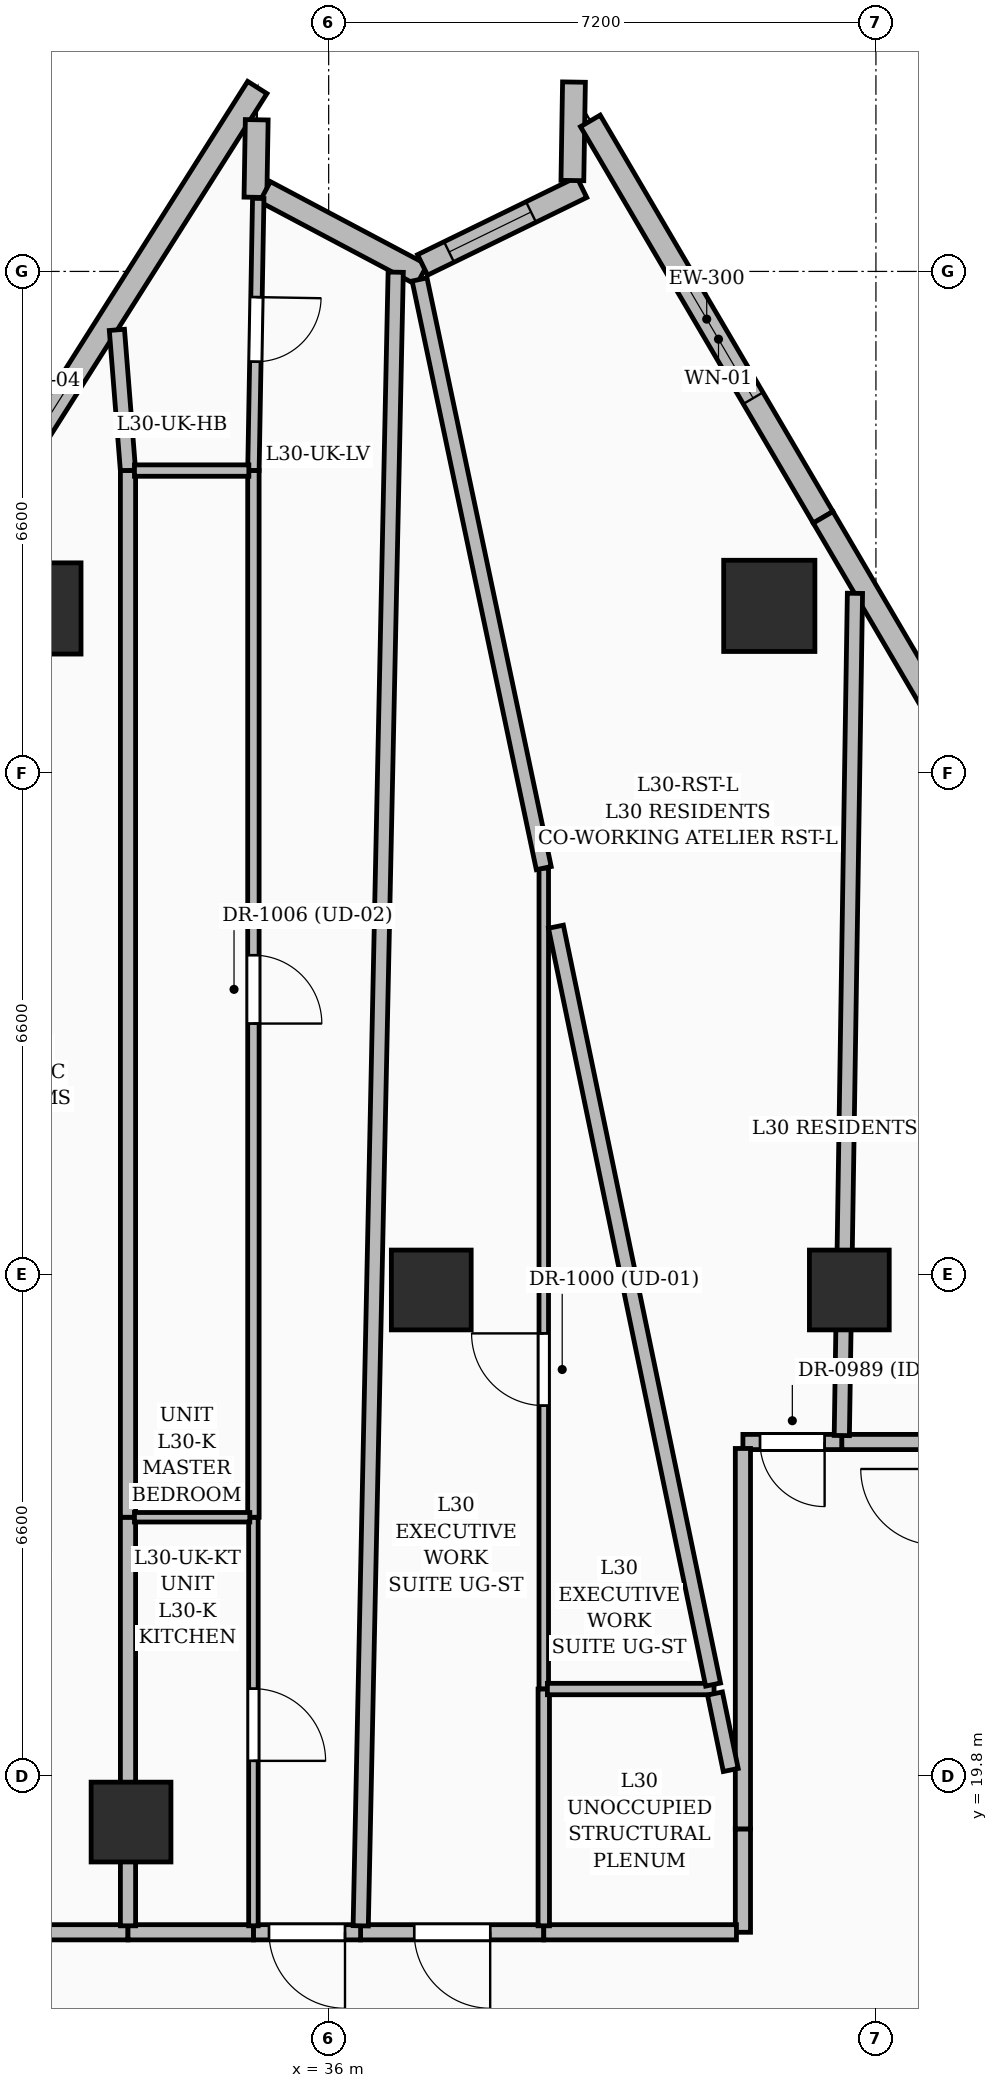
"""IFC4 building model, lengths in metres.
Left out: names, types, materials, properties, quantities, classifications, styles, units other than length and angle.
Written with IfcOpenShell. Run it as: python <this file> out.ifc"""

import sys

from ifc_helpers import new_model, si_unit, direction, frame, frame_2d, origin, origin_2d, place, context, subcontext, project, spatial, rectangle, extrude, element, fill, save


model = new_model("IFC4")
c1 = context("Model", 3, precision=1e-05, world=origin(), true_north=direction((0.0, 1.0)))
c2 = subcontext(c1, "Body", "Model", "MODEL_VIEW")
j1 = project(units=[si_unit("LENGTHUNIT", "METRE"), si_unit("PLANEANGLEUNIT", "RADIAN")], contexts=[c1])
p1 = place(None, origin())
s1 = spatial("IfcSite", under=j1, at=p1, CompositionType="ELEMENT")
p2 = place(p1, origin())
s2 = spatial("IfcBuilding", under=s1, at=p2, CompositionType="ELEMENT")
p3 = place(p2, frame((0.0, 0.0, 121.2)))
s3 = spatial("IfcBuildingStorey", under=s2, at=p3, CompositionType="ELEMENT", Elevation=121.2)
for number, where, z_axis, x_axis in (
    (1, (42.85, 26.2, 0.0), (0.0, 0.0, 1.0), (1.0, 0.0, 0.0)),
    (2, (37.35, 26.2, 0.0), (0.0, 0.0, 1.0), (1.0, 0.0, 0.0)),
    (3, (33.4, 19.2, 0.0), (0.0, 0.0, 1.0), (1.0, 0.0, 0.0)),
):
    element("IfcColumn", number, at=place(p3, frame(where, z_axis=z_axis, x_axis=x_axis)), inside=s3, PredefinedType="COLUMN", context=c2, shape_type="SweptSolid", body=[
        extrude(rectangle(XDim=1.05, YDim=1.05, at=origin_2d()), origin(), (0.0, 0.0, 1.0), 3.6),
    ])
for number, where, z_axis, x_axis in (
    (4, (41.797, 35.2, 0.0), (0.0, 0.0, 1.0), (1.0, 0.0, 0.0)),
    (5, (32.142, 35.166, 0.0), (0.0, 0.0, 1.0), (1.0, 0.0, 0.0)),
):
    element("IfcColumn", number, at=place(p3, frame(where, z_axis=z_axis, x_axis=x_axis)), inside=s3, PredefinedType="COLUMN", context=c2, shape_type="SweptSolid", body=[
        extrude(rectangle(XDim=1.2, YDim=1.2, at=origin_2d()), origin(), (0.0, 0.0, 1.0), 3.6),
    ])
p4 = place(p3, frame((31.604, 36.56, 0.0), z_axis=(0.0, 0.0, 1.0), x_axis=(0.53489387979, 0.844919249019, 0.0)))
e6 = element("IfcWall", 6, at=p4, inside=s3, PredefinedType="SOLIDWALL", context=c2, shape_type="SweptSolid", body=[
    extrude(rectangle(XDim=6.462, YDim=0.3, at=frame_2d((3.231, 0.0))), origin(), (0.0, 0.0, 1.0), 3.35),
])
p5 = place(p4, frame((0.675, 0.0, 0.8)))
e7 = element("IfcOpeningElement", 7, at=p5, cuts=e6, PredefinedType="OPENING", context=c2, shape_type="SweptSolid", body=[
    extrude(rectangle(XDim=1.2, YDim=1.8, at=frame_2d((0.6, 0.9))), frame((0.0, 0.16, 0.0), z_axis=(0.0, -1.0, 0.0), x_axis=(1.0, 0.0, 0.0)), (0.0, 0.0, 1.0), 0.32),
])
p6 = place(p3, frame((35.054, 41.595, 0.0), z_axis=(0.0, 0.0, 1.0), x_axis=(-0.016748069368, -0.99985974125, 0.0)))
e8 = element("IfcWall", 8, at=p6, inside=s3, PredefinedType="SOLIDWALL", context=c2, shape_type="SweptSolid", body=[
    extrude(rectangle(XDim=1.021, YDim=0.3, at=frame_2d((0.51, 0.0))), origin(), (0.0, 0.0, 1.0), 3.35),
])
p7 = place(p3, frame((35.163, 40.649, 0.0), z_axis=(0.0, 0.0, 1.0), x_axis=(0.883579385988, -0.468281399008, 0.0)))
e9 = element("IfcWall", 9, at=p7, inside=s3, PredefinedType="SOLIDWALL", context=c2, shape_type="SweptSolid", body=[
    extrude(rectangle(XDim=2.336, YDim=0.3, at=frame_2d((1.168, 0.0))), origin(), (0.0, 0.0, 1.0), 3.35),
])
p8 = place(p3, frame((37.235, 39.686, 0.0), z_axis=(0.0, 0.0, 1.0), x_axis=(0.898742269497, 0.438477289058, 0.0)))
e10 = element("IfcWall", 10, at=p8, inside=s3, PredefinedType="SOLIDWALL", context=c2, shape_type="SweptSolid", body=[
    extrude(rectangle(XDim=2.331, YDim=0.3, at=frame_2d((1.166, 0.0))), origin(), (0.0, 0.0, 1.0), 3.35),
])
p9 = place(p8, frame((0.388, 0.0, 0.8)))
e11 = element("IfcOpeningElement", 11, at=p9, cuts=e10, PredefinedType="OPENING", context=c2, shape_type="SweptSolid", body=[
    extrude(rectangle(XDim=1.2, YDim=1.8, at=frame_2d((0.6, 0.9))), frame((0.0, 0.16, 0.0), z_axis=(0.0, -1.0, 0.0), x_axis=(1.0, 0.0, 0.0)), (0.0, 0.0, 1.0), 0.32),
])
p10 = place(p3, frame((39.206, 40.796, 0.0), z_axis=(0.0, 0.0, 1.0), x_axis=(0.016208991858, 0.999868625662, 0.0)))
e12 = element("IfcWall", 12, at=p10, inside=s3, PredefinedType="SOLIDWALL", context=c2, shape_type="SweptSolid", body=[
    extrude(rectangle(XDim=1.295, YDim=0.3, at=frame_2d((0.648, 0.0))), origin(), (0.0, 0.0, 1.0), 3.35),
])
p11 = place(p3, frame((39.443, 41.58, 0.0), z_axis=(0.0, 0.0, 1.0), x_axis=(0.506351339064, -0.862327270489, 0.0)))
e13 = element("IfcWall", 13, at=p11, inside=s3, PredefinedType="SOLIDWALL", context=c2, shape_type="SweptSolid", body=[
    extrude(rectangle(XDim=6.048, YDim=0.3, at=frame_2d((3.024, 0.0))), origin(), (0.0, 0.0, 1.0), 3.35),
])
p12 = place(p11, frame((2.43, 0.0, 0.6)))
e14 = element("IfcOpeningElement", 14, at=p12, cuts=e13, PredefinedType="OPENING", context=c2, shape_type="SweptSolid", body=[
    extrude(rectangle(XDim=1.8, YDim=2.1, at=frame_2d((0.9, 1.05))), frame((0.0, 0.16, 0.0), z_axis=(0.0, -1.0, 0.0), x_axis=(1.0, 0.0, 0.0)), (0.0, 0.0, 1.0), 0.32),
])
p13 = place(p3, frame((42.505, 36.365, 0.0), z_axis=(0.0, 0.0, 1.0), x_axis=(0.506323446146, -0.862343648369, 0.0)))
e15 = element("IfcWall", 15, at=p13, inside=s3, PredefinedType="SOLIDWALL", context=c2, shape_type="SweptSolid", body=[
    extrude(rectangle(XDim=6.617, YDim=0.3, at=frame_2d((3.309, 0.0))), origin(), (0.0, 0.0, 1.0), 3.35),
])
p14 = place(p13, frame((3.1, 0.0, 0.55)))
e16 = element("IfcOpeningElement", 16, at=p14, cuts=e15, PredefinedType="OPENING", context=c2, shape_type="SweptSolid", body=[
    extrude(rectangle(XDim=1.6, YDim=2.2, at=frame_2d((0.8, 1.1))), frame((0.0, 0.16, 0.0), z_axis=(0.0, -1.0, 0.0), x_axis=(1.0, 0.0, 0.0)), (0.0, 0.0, 1.0), 0.32),
])
p15 = place(p3, frame((38.83, 17.75, 0.0), z_axis=(0.0, 0.0, 1.0), x_axis=(-1.0, 0.0, 0.0)))
e17 = element("IfcWall", 17, at=p15, inside=s3, PredefinedType="PARTITIONING", context=c2, shape_type="SweptSolid", body=[
    extrude(rectangle(XDim=2.41, YDim=0.2, at=frame_2d((1.205, 0.0))), origin(), (0.0, 0.0, 1.0), 3.35),
])
p16 = place(p15, frame((0.705, 0.0, 0.0)))
e18 = element("IfcOpeningElement", 18, at=p16, cuts=e17, PredefinedType="OPENING", context=c2, shape_type="SweptSolid", body=[
    extrude(rectangle(XDim=1.0, YDim=2.2, at=frame_2d((0.5, 1.1))), frame((0.0, 0.11, 0.0), z_axis=(0.0, -1.0, 0.0), x_axis=(1.0, 0.0, 0.0)), (0.0, 0.0, 1.0), 0.22),
])
p17 = place(p3, frame((41.45, 19.11, 0.0), z_axis=(0.0, 0.0, 1.0), x_axis=(0.0, -1.0, 0.0)))
e19 = element("IfcWall", 19, at=p17, inside=s3, PredefinedType="PARTITIONING", context=c2, shape_type="SweptSolid", body=[
    extrude(rectangle(XDim=1.36, YDim=0.2, at=frame_2d((0.68, 0.0))), origin(), (0.0, 0.0, 1.0), 3.35),
])
p18 = place(p3, frame((41.365, 17.75, 0.0), z_axis=(0.0, 0.0, 1.0), x_axis=(-1.0, 0.0, 0.0)))
e20 = element("IfcWall", 20, at=p18, inside=s3, PredefinedType="PARTITIONING", context=c2, shape_type="SweptSolid", body=[
    extrude(rectangle(XDim=2.535, YDim=0.2, at=frame_2d((1.268, 0.0))), origin(), (0.0, 0.0, 1.0), 3.35),
])
p19 = place(p3, frame((43.915, 24.2, 0.0), z_axis=(0.0, 0.0, 1.0), x_axis=(-1.0, 0.0, 0.0)))
e21 = element("IfcWall", 21, at=p19, inside=s3, PredefinedType="PARTITIONING", context=c2, shape_type="SweptSolid", body=[
    extrude(rectangle(XDim=1.165, YDim=0.2, at=frame_2d((0.583, 0.0))), origin(), (0.0, 0.0, 1.0), 2.436),
])
p20 = place(p3, frame((33.36, 17.75, 0.0), z_axis=(0.0, 0.0, 1.0), x_axis=(-1.0, 0.0, 0.0)))
e22 = element("IfcWall", 22, at=p20, inside=s3, PredefinedType="PARTITIONING", context=c2, shape_type="SweptSolid", body=[
    extrude(rectangle(XDim=1.41, YDim=0.2, at=frame_2d((0.705, 0.0))), origin(), (0.0, 0.0, 1.0), 3.35),
])
p21 = place(p3, frame((36.42, 17.75, 0.0), z_axis=(0.0, 0.0, 1.0), x_axis=(-1.0, 0.0, 0.0)))
e23 = element("IfcWall", 23, at=p21, inside=s3, PredefinedType="PARTITIONING", context=c2, shape_type="SweptSolid", body=[
    extrude(rectangle(XDim=1.41, YDim=0.2, at=frame_2d((0.705, 0.0))), origin(), (0.0, 0.0, 1.0), 3.35),
])
p22 = place(p21, frame((0.205, 0.0, 0.0)))
e24 = element("IfcOpeningElement", 24, at=p22, cuts=e23, PredefinedType="OPENING", context=c2, shape_type="SweptSolid", body=[
    extrude(rectangle(XDim=1.0, YDim=2.2, at=frame_2d((0.5, 1.1))), frame((0.0, 0.11, 0.0), z_axis=(0.0, -1.0, 0.0), x_axis=(1.0, 0.0, 0.0)), (0.0, 0.0, 1.0), 0.22),
])
p23 = place(p3, frame((35.01, 17.75, 0.0), z_axis=(0.0, 0.0, 1.0), x_axis=(-1.0, 0.0, 0.0)))
e25 = element("IfcWall", 25, at=p23, inside=s3, PredefinedType="PARTITIONING", context=c2, shape_type="SweptSolid", body=[
    extrude(rectangle(XDim=1.65, YDim=0.2, at=frame_2d((0.825, 0.0))), origin(), (0.0, 0.0, 1.0), 2.436),
])
p24 = place(p3, frame((42.75, 24.2, 0.0), z_axis=(0.0, 0.0, 1.0), x_axis=(-1.0, 0.0, 0.0)))
e26 = element("IfcWall", 26, at=p24, inside=s3, PredefinedType="PARTITIONING", context=c2, shape_type="SweptSolid", body=[
    extrude(rectangle(XDim=1.3, YDim=0.2, at=frame_2d((0.65, 0.0))), origin(), (0.0, 0.0, 1.0), 3.35),
])
p25 = place(p24, frame((0.225, 0.0, 0.0)))
e27 = element("IfcOpeningElement", 27, at=p25, cuts=e26, PredefinedType="OPENING", context=c2, shape_type="SweptSolid", body=[
    extrude(rectangle(XDim=0.85, YDim=2.1, at=frame_2d((0.425, 1.05))), frame((0.0, 0.11, 0.0), z_axis=(0.0, -1.0, 0.0), x_axis=(1.0, 0.0, 0.0)), (0.0, 0.0, 1.0), 0.22),
])
p26 = place(p3, frame((41.45, 24.115, 0.0), z_axis=(0.0, 0.0, 1.0), x_axis=(0.0, -1.0, 0.0)))
e28 = element("IfcWall", 28, at=p26, inside=s3, PredefinedType="PARTITIONING", context=c2, shape_type="SweptSolid", body=[
    extrude(rectangle(XDim=5.005, YDim=0.2, at=frame_2d((2.502, 0.0))), origin(), (0.0, 0.0, 1.0), 3.35),
])
p27 = place(p3, frame((38.83, 20.95, 0.0), z_axis=(0.0, 0.0, 1.0), x_axis=(0.0, 1.0, 0.0)))
e29 = element("IfcWall", 29, at=p27, inside=s3, PredefinedType="PARTITIONING", context=c2, shape_type="SweptSolid", body=[
    extrude(rectangle(XDim=10.8, YDim=0.125, at=frame_2d((5.4, 0.0))), origin(), (0.0, 0.0, 1.0), 2.436),
])
p28 = place(p27, frame((3.729, 0.0, 0.0)))
e30 = element("IfcOpeningElement", 30, at=p28, cuts=e29, PredefinedType="OPENING", context=c2, shape_type="SweptSolid", body=[
    extrude(rectangle(XDim=0.95, YDim=2.2, at=frame_2d((0.475, 1.1))), frame((0.0, 0.072, 0.0), z_axis=(0.0, -1.0, 0.0), x_axis=(1.0, 0.0, 0.0)), (0.0, 0.0, 1.0), 0.145),
])
p29 = place(p3, frame((38.83, 17.835, 0.0), z_axis=(0.0, 0.0, 1.0), x_axis=(0.0, 1.0, 0.0)))
e31 = element("IfcWall", 31, at=p29, inside=s3, PredefinedType="PARTITIONING", context=c2, shape_type="SweptSolid", body=[
    extrude(rectangle(XDim=3.115, YDim=0.15, at=frame_2d((1.558, 0.0))), origin(), (0.0, 0.0, 1.0), 3.35),
])
p30 = place(p3, frame((36.882, 39.59, 0.0), z_axis=(0.0, 0.0, 1.0), x_axis=(-0.02116035097, -0.999776094707, 0.0)))
e32 = element("IfcWall", 32, at=p30, inside=s3, PredefinedType="PARTITIONING", context=c2, shape_type="SweptSolid", body=[
    extrude(rectangle(XDim=21.76, YDim=0.2, at=frame_2d((10.88, 0.0))), origin(), (0.0, 0.0, 1.0), 2.372),
])
p31 = place(p3, frame((38.83, 31.75, 0.0), z_axis=(0.0, 0.0, 1.0), x_axis=(-0.206462862954, 0.978454437478, 0.0)))
e33 = element("IfcWall", 33, at=p31, inside=s3, PredefinedType="PARTITIONING", context=c2, shape_type="SweptSolid", body=[
    extrude(rectangle(XDim=7.914, YDim=0.2, at=frame_2d((3.957, 0.0))), origin(), (0.0, 0.0, 1.0), 2.57),
])
p32 = place(p3, frame((38.877, 20.95, 0.0), z_axis=(0.0, 0.0, 1.0), x_axis=(1.0, 0.0, 0.0)))
e34 = element("IfcWall", 34, at=p32, inside=s3, PredefinedType="PARTITIONING", context=c2, shape_type="SweptSolid", body=[
    extrude(rectangle(XDim=2.193, YDim=0.15, at=frame_2d((1.096, 0.0))), origin(), (0.0, 0.0, 1.0), 3.35),
])
p33 = place(p3, frame((41.058, 21.009, 0.0), z_axis=(0.0, 0.0, 1.0), x_axis=(-0.203082872661, 0.979161552979, 0.0)))
e35 = element("IfcWall", 35, at=p33, inside=s3, PredefinedType="PARTITIONING", context=c2, shape_type="SweptSolid", body=[
    extrude(rectangle(XDim=10.182, YDim=0.2, at=frame_2d((5.091, 0.0))), origin(), (0.0, 0.0, 1.0), 2.436),
])
p34 = place(p3, frame((41.29, 19.885, 0.0), z_axis=(0.0, 0.0, 1.0), x_axis=(-0.20246415957, 0.979289673227, 0.0)))
e36 = element("IfcWall", 36, at=p34, inside=s3, PredefinedType="PARTITIONING", context=c2, shape_type="SweptSolid", body=[
    extrude(rectangle(XDim=1.027, YDim=0.2, at=frame_2d((0.514, 0.0))), origin(), (0.0, 0.0, 1.0), 3.35),
])
p35 = place(p3, frame((42.924, 35.365, 0.0), z_axis=(0.0, 0.0, 1.0), x_axis=(-0.015620339734, -0.999877995051, 0.0)))
e37 = element("IfcWall", 37, at=p35, inside=s3, PredefinedType="PARTITIONING", context=c2, shape_type="SweptSolid", body=[
    extrude(rectangle(XDim=11.082, YDim=0.2, at=frame_2d((5.541, 0.0))), origin(), (0.0, 0.0, 1.0), 2.372),
])
p36 = place(p3, frame((33.36, 36.98, 0.0), z_axis=(0.0, 0.0, 1.0), x_axis=(-0.07862683496, 0.99690411817, 0.0)))
e38 = element("IfcWall", 38, at=p36, inside=s3, PredefinedType="PARTITIONING", context=c2, shape_type="SweptSolid", body=[
    extrude(rectangle(XDim=1.857, YDim=0.2, at=frame_2d((0.928, 0.0))), origin(), (0.0, 0.0, 1.0), 3.35),
])
p37 = place(p3, frame((33.36, 17.835, 0.0), z_axis=(0.0, 0.0, 1.0), x_axis=(0.0, 1.0, 0.0)))
e39 = element("IfcWall", 39, at=p37, inside=s3, PredefinedType="PARTITIONING", context=c2, shape_type="SweptSolid", body=[
    extrude(rectangle(XDim=5.375, YDim=0.2, at=frame_2d((2.688, 0.0))), origin(), (0.0, 0.0, 1.0), 2.436),
])
p38 = place(p3, frame((33.36, 23.21, 0.0), z_axis=(0.0, 0.0, 1.0), x_axis=(0.0, 1.0, 0.0)))
e40 = element("IfcWall", 40, at=p38, inside=s3, PredefinedType="PARTITIONING", context=c2, shape_type="SweptSolid", body=[
    extrude(rectangle(XDim=13.77, YDim=0.2, at=frame_2d((6.885, 0.0))), origin(), (0.0, 0.0, 1.0), 2.372),
])
p39 = place(p3, frame((35.073, 40.56, 0.0), z_axis=(0.0, 0.0, 1.0), x_axis=(-0.017726501673, -0.999842873225, 0.0)))
e41 = element("IfcWall", 41, at=p39, inside=s3, PredefinedType="PARTITIONING", context=c2, shape_type="SweptSolid", body=[
    extrude(rectangle(XDim=3.581, YDim=0.15, at=frame_2d((1.791, 0.0))), origin(), (0.0, 0.0, 1.0), 3.35),
])
p40 = place(p39, frame((1.298, 0.0, 0.0)))
e42 = element("IfcOpeningElement", 42, at=p40, cuts=e41, PredefinedType="OPENING", context=c2, shape_type="SweptSolid", body=[
    extrude(rectangle(XDim=0.85, YDim=2.1, at=frame_2d((0.425, 1.05))), frame((0.0, 0.085, 0.0), z_axis=(0.0, -1.0, 0.0), x_axis=(1.0, 0.0, 0.0)), (0.0, 0.0, 1.0), 0.17),
])
p41 = place(p3, frame((35.01, 23.21, 0.0), z_axis=(0.0, 0.0, 1.0), x_axis=(0.0, -1.0, 0.0)))
e43 = element("IfcWall", 43, at=p41, inside=s3, PredefinedType="PARTITIONING", context=c2, shape_type="SweptSolid", body=[
    extrude(rectangle(XDim=5.375, YDim=0.125, at=frame_2d((2.688, 0.0))), origin(), (0.0, 0.0, 1.0), 2.436),
])
p42 = place(p41, frame((2.255, 0.0, 0.0)))
e44 = element("IfcOpeningElement", 44, at=p42, cuts=e43, PredefinedType="OPENING", context=c2, shape_type="SweptSolid", body=[
    extrude(rectangle(XDim=0.95, YDim=2.2, at=frame_2d((0.475, 1.1))), frame((0.0, 0.072, 0.0), z_axis=(0.0, -1.0, 0.0), x_axis=(1.0, 0.0, 0.0)), (0.0, 0.0, 1.0), 0.145),
])
p43 = place(p3, frame((35.01, 36.98, 0.0), z_axis=(0.0, 0.0, 1.0), x_axis=(0.0, -1.0, 0.0)))
e45 = element("IfcWall", 45, at=p43, inside=s3, PredefinedType="PARTITIONING", context=c2, shape_type="SweptSolid", body=[
    extrude(rectangle(XDim=13.77, YDim=0.15, at=frame_2d((6.885, 0.0))), origin(), (0.0, 0.0, 1.0), 2.372),
])
p44 = place(p43, frame((6.375, 0.0, 0.0)))
e46 = element("IfcOpeningElement", 46, at=p44, cuts=e45, PredefinedType="OPENING", context=c2, shape_type="SweptSolid", body=[
    extrude(rectangle(XDim=0.9, YDim=2.15, at=frame_2d((0.45, 1.075))), frame((0.0, 0.085, 0.0), z_axis=(0.0, -1.0, 0.0), x_axis=(1.0, 0.0, 0.0)), (0.0, 0.0, 1.0), 0.17),
])
p45 = place(p3, frame((33.445, 36.98, 0.0), z_axis=(0.0, 0.0, 1.0), x_axis=(1.0, 0.0, 0.0)))
e47 = element("IfcWall", 47, at=p45, inside=s3, PredefinedType="PARTITIONING", context=c2, shape_type="SweptSolid", body=[
    extrude(rectangle(XDim=1.505, YDim=0.15, at=frame_2d((0.752, 0.0))), origin(), (0.0, 0.0, 1.0), 3.35),
])
p46 = place(p3, frame((34.962, 23.21, 0.0), z_axis=(0.0, 0.0, 1.0), x_axis=(-1.0, 0.0, 0.0)))
e48 = element("IfcWall", 48, at=p46, inside=s3, PredefinedType="PARTITIONING", context=c2, shape_type="SweptSolid", body=[
    extrude(rectangle(XDim=1.517, YDim=0.125, at=frame_2d((0.759, 0.0))), origin(), (0.0, 0.0, 1.0), 3.35),
])
p47 = place(p5, origin())
e49 = element("IfcWindow", 49, at=p47, inside=s3, PartitioningType="SINGLE_PANEL", PredefinedType="WINDOW", context=c2, shape_type="SweptSolid", body=[
    extrude(rectangle(XDim=1.2, YDim=1.8, at=frame_2d((0.6, 0.9))), frame((0.0, 0.03, 0.0), z_axis=(0.0, -1.0, 0.0), x_axis=(1.0, 0.0, 0.0)), (0.0, 0.0, 1.0), 0.06),
])
fill(e7, e49)
p48 = place(p9, origin())
e50 = element("IfcWindow", 50, at=p48, inside=s3, PartitioningType="SINGLE_PANEL", PredefinedType="WINDOW", context=c2, shape_type="SweptSolid", body=[
    extrude(rectangle(XDim=1.2, YDim=1.8, at=frame_2d((0.6, 0.9))), frame((0.0, 0.03, 0.0), z_axis=(0.0, -1.0, 0.0), x_axis=(1.0, 0.0, 0.0)), (0.0, 0.0, 1.0), 0.06),
])
fill(e11, e50)
p49 = place(p12, origin())
e51 = element("IfcWindow", 51, at=p49, inside=s3, PartitioningType="SINGLE_PANEL", PredefinedType="WINDOW", context=c2, shape_type="SweptSolid", body=[
    extrude(rectangle(XDim=1.8, YDim=2.1, at=frame_2d((0.9, 1.05))), frame((0.0, 0.03, 0.0), z_axis=(0.0, -1.0, 0.0), x_axis=(1.0, 0.0, 0.0)), (0.0, 0.0, 1.0), 0.06),
])
fill(e14, e51)
p50 = place(p25, origin())
e52 = element("IfcDoor", 52, at=p50, inside=s3, OperationType="SINGLE_SWING_LEFT", PredefinedType="DOOR", context=c2, shape_type="SweptSolid", body=[
    extrude(rectangle(XDim=0.85, YDim=2.1, at=frame_2d((0.425, 1.05))), frame((0.0, 0.025, 0.0), z_axis=(0.0, -1.0, 0.0), x_axis=(1.0, 0.0, 0.0)), (0.0, 0.0, 1.0), 0.05),
])
fill(e27, e52)
p51 = place(p16, origin())
e53 = element("IfcDoor", 53, at=p51, inside=s3, OperationType="SINGLE_SWING_LEFT", PredefinedType="DOOR", context=c2, shape_type="SweptSolid", body=[
    extrude(rectangle(XDim=1.0, YDim=2.2, at=frame_2d((0.5, 1.1))), frame((0.0, 0.025, 0.0), z_axis=(0.0, -1.0, 0.0), x_axis=(1.0, 0.0, 0.0)), (0.0, 0.0, 1.0), 0.05),
])
fill(e18, e53)
p52 = place(p28, origin())
e54 = element("IfcDoor", 54, at=p52, inside=s3, OperationType="SINGLE_SWING_RIGHT", PredefinedType="DOOR", context=c2, shape_type="SweptSolid", body=[
    extrude(rectangle(XDim=0.95, YDim=2.2, at=frame_2d((0.475, 1.1))), frame((0.0, 0.025, 0.0), z_axis=(0.0, -1.0, 0.0), x_axis=(1.0, 0.0, 0.0)), (0.0, 0.0, 1.0), 0.05),
])
fill(e30, e54)
p53 = place(p22, origin())
e55 = element("IfcDoor", 55, at=p53, inside=s3, OperationType="SINGLE_SWING_LEFT", PredefinedType="DOOR", context=c2, shape_type="SweptSolid", body=[
    extrude(rectangle(XDim=1.0, YDim=2.2, at=frame_2d((0.5, 1.1))), frame((0.0, 0.025, 0.0), z_axis=(0.0, -1.0, 0.0), x_axis=(1.0, 0.0, 0.0)), (0.0, 0.0, 1.0), 0.05),
])
fill(e24, e55)
p54 = place(p42, origin())
e56 = element("IfcDoor", 56, at=p54, inside=s3, OperationType="SINGLE_SWING_RIGHT", PredefinedType="DOOR", context=c2, shape_type="SweptSolid", body=[
    extrude(rectangle(XDim=0.95, YDim=2.2, at=frame_2d((0.475, 1.1))), frame((0.0, 0.025, 0.0), z_axis=(0.0, -1.0, 0.0), x_axis=(1.0, 0.0, 0.0)), (0.0, 0.0, 1.0), 0.05),
])
fill(e44, e56)
p55 = place(p40, origin())
e57 = element("IfcDoor", 57, at=p55, inside=s3, OperationType="SINGLE_SWING_LEFT", PredefinedType="DOOR", context=c2, shape_type="SweptSolid", body=[
    extrude(rectangle(XDim=0.85, YDim=2.1, at=frame_2d((0.425, 1.05))), frame((0.0, 0.025, 0.0), z_axis=(0.0, -1.0, 0.0), x_axis=(1.0, 0.0, 0.0)), (0.0, 0.0, 1.0), 0.05),
])
fill(e42, e57)
p56 = place(p44, origin())
e58 = element("IfcDoor", 58, at=p56, inside=s3, OperationType="SINGLE_SWING_RIGHT", PredefinedType="DOOR", context=c2, shape_type="SweptSolid", body=[
    extrude(rectangle(XDim=0.9, YDim=2.15, at=frame_2d((0.45, 1.075))), frame((0.0, 0.025, 0.0), z_axis=(0.0, -1.0, 0.0), x_axis=(1.0, 0.0, 0.0)), (0.0, 0.0, 1.0), 0.05),
])
fill(e46, e58)
save(model, sys.argv[1])
